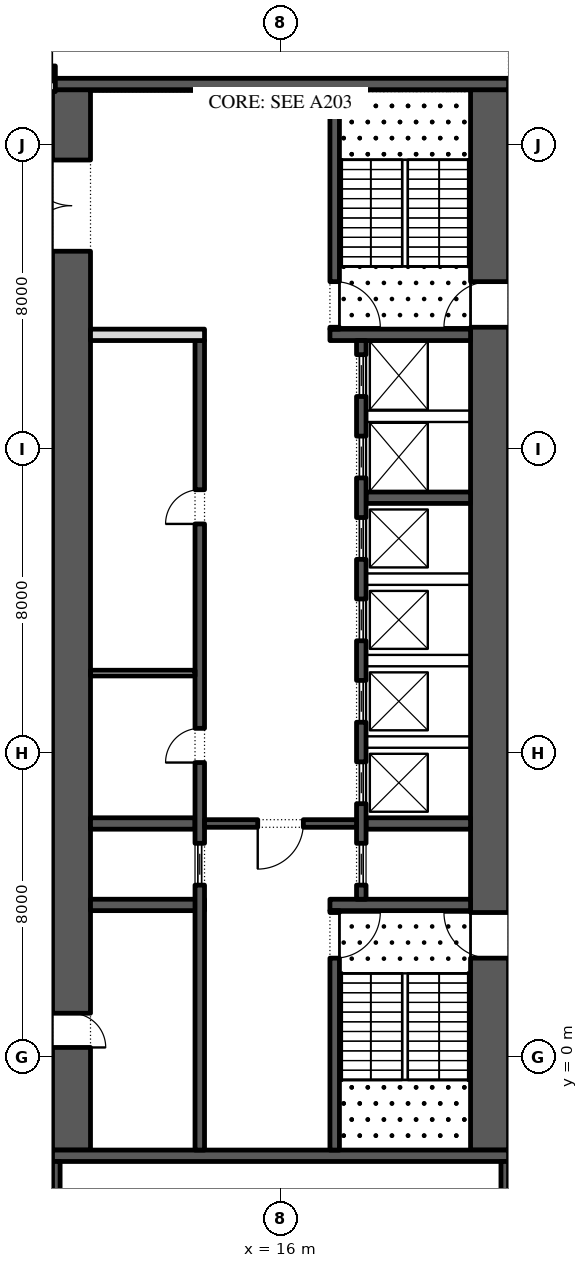
"""IFC4 building model, lengths in metres.
Left out: names, types, materials, properties, quantities, classifications, styles, units other than length and angle.
Written with IfcOpenShell. Run it as: python <this file> out.ifc"""

import sys

from ifc_helpers import new_model, si_unit, direction, frame, frame_2d, origin, place, context, subcontext, project, spatial, rectangle, extrude, element, fill, save


model = new_model("IFC4")
c1 = context("Model", 3, precision=1e-05, world=origin(), true_north=direction((0.0, 1.0)))
c2 = subcontext(c1, "Body", "Model", "MODEL_VIEW")
j1 = project(units=[si_unit("LENGTHUNIT", "METRE"), si_unit("PLANEANGLEUNIT", "RADIAN")], contexts=[c1])
p1 = place(None, origin())
s1 = spatial("IfcSite", under=j1, at=p1, CompositionType="ELEMENT")
p2 = place(p1, origin())
s2 = spatial("IfcBuilding", under=s1, at=p2, CompositionType="ELEMENT")
p3 = place(p2, origin())
s3 = spatial("IfcBuildingStorey", under=s2, at=p3, CompositionType="ELEMENT", Elevation=0.0)
p4 = place(p3, frame((21.5, -2.45, 0.0), z_axis=(0.0, 0.0, 1.0), x_axis=(0.0, 1.0, 0.0)))
e1 = element("IfcWall", 1, at=p4, inside=s3, PredefinedType="SHEAR", context=c2, shape_type="SweptSolid", body=[
    extrude(rectangle(XDim=27.9, YDim=1.0, at=frame_2d((13.95, 0.0))), origin(), (0.0, 0.0, 1.0), 7.7),
])
p5 = place(p4, frame((5.05, 0.0, 0.0)))
e2 = element("IfcOpeningElement", 2, at=p5, cuts=e1, PredefinedType="OPENING", context=c2, shape_type="SweptSolid", body=[
    extrude(rectangle(XDim=1.2, YDim=2.1, at=frame_2d((0.6, 1.05))), frame((0.0, 0.51, 0.0), z_axis=(0.0, -1.0, 0.0), x_axis=(1.0, 0.0, 0.0)), (0.0, 0.0, 1.0), 1.02),
])
p6 = place(p4, frame((21.65, 0.0, 0.0)))
e3 = element("IfcOpeningElement", 3, at=p6, cuts=e1, PredefinedType="OPENING", context=c2, shape_type="SweptSolid", body=[
    extrude(rectangle(XDim=1.2, YDim=2.1, at=frame_2d((0.6, 1.05))), frame((0.0, 0.51, 0.0), z_axis=(0.0, -1.0, 0.0), x_axis=(1.0, 0.0, 0.0)), (0.0, 0.0, 1.0), 1.02),
])
p7 = place(p3, frame((10.5, -2.45, 0.0), z_axis=(0.0, 0.0, 1.0), x_axis=(0.0, 1.0, 0.0)))
e4 = element("IfcWall", 4, at=p7, inside=s3, PredefinedType="SHEAR", context=c2, shape_type="SweptSolid", body=[
    extrude(rectangle(XDim=27.9, YDim=1.0, at=frame_2d((13.95, 0.0))), origin(), (0.0, 0.0, 1.0), 7.7),
])
p8 = place(p7, frame((23.65, 0.0, 0.0)))
e5 = element("IfcOpeningElement", 5, at=p8, cuts=e4, PredefinedType="OPENING", context=c2, shape_type="SweptSolid", body=[
    extrude(rectangle(XDim=2.4, YDim=2.1, at=frame_2d((1.2, 1.05))), frame((0.0, 0.51, 0.0), z_axis=(0.0, -1.0, 0.0), x_axis=(1.0, 0.0, 0.0)), (0.0, 0.0, 1.0), 1.02),
])
p9 = place(p7, frame((2.7, 0.0, 0.0)))
e6 = element("IfcOpeningElement", 6, at=p9, cuts=e4, PredefinedType="OPENING", context=c2, shape_type="SweptSolid", body=[
    extrude(rectangle(XDim=0.9, YDim=2.1, at=frame_2d((0.45, 1.05))), frame((0.0, 0.51, 0.0), z_axis=(0.0, -1.0, 0.0), x_axis=(1.0, 0.0, 0.0)), (0.0, 0.0, 1.0), 1.02),
])
for number, where, z_axis, x_axis in (
    (7, (10.0, -2.6, 0.0), (0.0, 0.0, 1.0), (1.0, 0.0, 0.0)),
    (8, (10.0, 25.6, 0.0), (0.0, 0.0, 1.0), (1.0, 0.0, 0.0)),
):
    element("IfcWall", number, at=place(p3, frame(where, z_axis=z_axis, x_axis=x_axis)), inside=s3, PredefinedType="SHEAR", context=c2, shape_type="SweptSolid", body=[
        extrude(rectangle(XDim=12.0, YDim=0.3, at=frame_2d((6.0, 0.0))), origin(), (0.0, 0.0, 1.0), 7.7),
    ])
p10 = place(p3, frame((17.3, 4.0, 0.0), z_axis=(0.0, 0.0, 1.0), x_axis=(1.0, 0.0, 0.0)))
e9 = element("IfcWall", 9, at=p10, inside=s3, PredefinedType="SHEAR", context=c2, shape_type="SweptSolid", body=[
    extrude(rectangle(XDim=3.7, YDim=0.3, at=frame_2d((1.85, 0.0))), origin(), (0.0, 0.0, 1.0), 7.7),
])
p11 = place(p3, frame((17.425, -2.45, 0.0), z_axis=(0.0, 0.0, 1.0), x_axis=(0.0, 1.0, 0.0)))
e10 = element("IfcWall", 10, at=p11, inside=s3, PredefinedType="SHEAR", context=c2, shape_type="SweptSolid", body=[
    extrude(rectangle(XDim=6.3, YDim=0.25, at=frame_2d((3.15, 0.0))), origin(), (0.0, 0.0, 1.0), 7.7),
])
p12 = place(p11, frame((5.05, 0.0, 0.0)))
e11 = element("IfcOpeningElement", 11, at=p12, cuts=e10, PredefinedType="OPENING", context=c2, shape_type="SweptSolid", body=[
    extrude(rectangle(XDim=1.2, YDim=2.1, at=frame_2d((0.6, 1.05))), frame((0.0, 0.135, 0.0), z_axis=(0.0, -1.0, 0.0), x_axis=(1.0, 0.0, 0.0)), (0.0, 0.0, 1.0), 0.27),
])
p13 = place(p3, frame((17.3, 19.0, 0.0), z_axis=(0.0, 0.0, 1.0), x_axis=(1.0, 0.0, 0.0)))
e12 = element("IfcWall", 12, at=p13, inside=s3, PredefinedType="SHEAR", context=c2, shape_type="SweptSolid", body=[
    extrude(rectangle(XDim=3.7, YDim=0.3, at=frame_2d((1.85, 0.0))), origin(), (0.0, 0.0, 1.0), 7.7),
])
p14 = place(p3, frame((17.425, 19.15, 0.0), z_axis=(0.0, 0.0, 1.0), x_axis=(0.0, 1.0, 0.0)))
e13 = element("IfcWall", 13, at=p14, inside=s3, PredefinedType="SHEAR", context=c2, shape_type="SweptSolid", body=[
    extrude(rectangle(XDim=6.3, YDim=0.25, at=frame_2d((3.15, 0.0))), origin(), (0.0, 0.0, 1.0), 7.7),
])
p15 = place(p14, frame((0.05, 0.0, 0.0)))
e14 = element("IfcOpeningElement", 14, at=p15, cuts=e13, PredefinedType="OPENING", context=c2, shape_type="SweptSolid", body=[
    extrude(rectangle(XDim=1.2, YDim=2.1, at=frame_2d((0.6, 1.05))), frame((0.0, 0.135, 0.0), z_axis=(0.0, -1.0, 0.0), x_axis=(1.0, 0.0, 0.0)), (0.0, 0.0, 1.0), 0.27),
])
for number, where, z_axis, x_axis in (
    (15, (18.25, 6.143, 0.0), (0.0, 0.0, 1.0), (1.0, 0.0, 0.0)),
    (16, (18.25, 14.714, 0.0), (0.0, 0.0, 1.0), (1.0, 0.0, 0.0)),
):
    element("IfcWall", number, at=place(p3, frame(where, z_axis=z_axis, x_axis=x_axis)), inside=s3, PredefinedType="SHEAR", context=c2, shape_type="SweptSolid", body=[
        extrude(rectangle(XDim=2.75, YDim=0.3, at=frame_2d((1.375, 0.0))), origin(), (0.0, 0.0, 1.0), 7.7),
    ])
p16 = place(p3, frame((18.125, 4.15, 0.0), z_axis=(0.0, 0.0, 1.0), x_axis=(0.0, 1.0, 0.0)))
e17 = element("IfcWall", 17, at=p16, inside=s3, PredefinedType="SHEAR", context=c2, shape_type="SweptSolid", body=[
    extrude(rectangle(XDim=14.7, YDim=0.25, at=frame_2d((7.35, 0.0))), origin(), (0.0, 0.0, 1.0), 7.7),
])
p17 = place(p16, frame((0.371, 0.0, 0.0)))
e18 = element("IfcOpeningElement", 18, at=p17, cuts=e17, PredefinedType="OPENING", context=c2, shape_type="SweptSolid", body=[
    extrude(rectangle(XDim=1.1, YDim=2.1, at=frame_2d((0.55, 1.05))), frame((0.0, 0.135, 0.0), z_axis=(0.0, -1.0, 0.0), x_axis=(1.0, 0.0, 0.0)), (0.0, 0.0, 1.0), 0.27),
])
p18 = place(p16, frame((2.514, 0.0, 0.0)))
e19 = element("IfcOpeningElement", 19, at=p18, cuts=e17, PredefinedType="OPENING", context=c2, shape_type="SweptSolid", body=[
    extrude(rectangle(XDim=1.1, YDim=2.1, at=frame_2d((0.55, 1.05))), frame((0.0, 0.135, 0.0), z_axis=(0.0, -1.0, 0.0), x_axis=(1.0, 0.0, 0.0)), (0.0, 0.0, 1.0), 0.27),
])
p19 = place(p16, frame((4.657, 0.0, 0.0)))
e20 = element("IfcOpeningElement", 20, at=p19, cuts=e17, PredefinedType="OPENING", context=c2, shape_type="SweptSolid", body=[
    extrude(rectangle(XDim=1.1, YDim=2.1, at=frame_2d((0.55, 1.05))), frame((0.0, 0.135, 0.0), z_axis=(0.0, -1.0, 0.0), x_axis=(1.0, 0.0, 0.0)), (0.0, 0.0, 1.0), 0.27),
])
p20 = place(p16, frame((6.8, 0.0, 0.0)))
e21 = element("IfcOpeningElement", 21, at=p20, cuts=e17, PredefinedType="OPENING", context=c2, shape_type="SweptSolid", body=[
    extrude(rectangle(XDim=1.1, YDim=2.1, at=frame_2d((0.55, 1.05))), frame((0.0, 0.135, 0.0), z_axis=(0.0, -1.0, 0.0), x_axis=(1.0, 0.0, 0.0)), (0.0, 0.0, 1.0), 0.27),
])
p21 = place(p16, frame((8.943, 0.0, 0.0)))
e22 = element("IfcOpeningElement", 22, at=p21, cuts=e17, PredefinedType="OPENING", context=c2, shape_type="SweptSolid", body=[
    extrude(rectangle(XDim=1.1, YDim=2.1, at=frame_2d((0.55, 1.05))), frame((0.0, 0.135, 0.0), z_axis=(0.0, -1.0, 0.0), x_axis=(1.0, 0.0, 0.0)), (0.0, 0.0, 1.0), 0.27),
])
p22 = place(p16, frame((11.086, 0.0, 0.0)))
e23 = element("IfcOpeningElement", 23, at=p22, cuts=e17, PredefinedType="OPENING", context=c2, shape_type="SweptSolid", body=[
    extrude(rectangle(XDim=1.1, YDim=2.1, at=frame_2d((0.55, 1.05))), frame((0.0, 0.135, 0.0), z_axis=(0.0, -1.0, 0.0), x_axis=(1.0, 0.0, 0.0)), (0.0, 0.0, 1.0), 0.27),
])
p23 = place(p16, frame((13.229, 0.0, 0.0)))
e24 = element("IfcOpeningElement", 24, at=p23, cuts=e17, PredefinedType="OPENING", context=c2, shape_type="SweptSolid", body=[
    extrude(rectangle(XDim=1.1, YDim=2.1, at=frame_2d((0.55, 1.05))), frame((0.0, 0.135, 0.0), z_axis=(0.0, -1.0, 0.0), x_axis=(1.0, 0.0, 0.0)), (0.0, 0.0, 1.0), 0.27),
])
p24 = place(p3, frame((11.0, 4.0, 0.0), z_axis=(0.0, 0.0, 1.0), x_axis=(1.0, 0.0, 0.0)))
e25 = element("IfcWall", 25, at=p24, inside=s3, PredefinedType="SHEAR", context=c2, shape_type="SweptSolid", body=[
    extrude(rectangle(XDim=3.0, YDim=0.3, at=frame_2d((1.5, 0.0))), origin(), (0.0, 0.0, 1.0), 7.7),
])
p25 = place(p3, frame((11.0, 6.143, 0.0), z_axis=(0.0, 0.0, 1.0), x_axis=(1.0, 0.0, 0.0)))
e26 = element("IfcWall", 26, at=p25, inside=s3, PredefinedType="SHEAR", context=c2, shape_type="SweptSolid", body=[
    extrude(rectangle(XDim=2.75, YDim=0.3, at=frame_2d((1.375, 0.0))), origin(), (0.0, 0.0, 1.0), 7.7),
])
p26 = place(p3, frame((13.875, -2.45, 0.0), z_axis=(0.0, 0.0, 1.0), x_axis=(0.0, 1.0, 0.0)))
e27 = element("IfcWall", 27, at=p26, inside=s3, PredefinedType="SHEAR", context=c2, shape_type="SweptSolid", body=[
    extrude(rectangle(XDim=21.3, YDim=0.25, at=frame_2d((10.65, 0.0))), origin(), (0.0, 0.0, 1.0), 7.7),
])
p27 = place(p26, frame((10.196, 0.0, 0.0)))
e28 = element("IfcOpeningElement", 28, at=p27, cuts=e27, PredefinedType="OPENING", context=c2, shape_type="SweptSolid", body=[
    extrude(rectangle(XDim=0.9, YDim=2.1, at=frame_2d((0.45, 1.05))), frame((0.0, 0.135, 0.0), z_axis=(0.0, -1.0, 0.0), x_axis=(1.0, 0.0, 0.0)), (0.0, 0.0, 1.0), 0.27),
])
p28 = place(p26, frame((16.475, 0.0, 0.0)))
e29 = element("IfcOpeningElement", 29, at=p28, cuts=e27, PredefinedType="OPENING", context=c2, shape_type="SweptSolid", body=[
    extrude(rectangle(XDim=0.9, YDim=2.1, at=frame_2d((0.45, 1.05))), frame((0.0, 0.135, 0.0), z_axis=(0.0, -1.0, 0.0), x_axis=(1.0, 0.0, 0.0)), (0.0, 0.0, 1.0), 0.27),
])
p29 = place(p26, frame((6.971, 0.0, 0.0)))
e30 = element("IfcOpeningElement", 30, at=p29, cuts=e27, PredefinedType="OPENING", context=c2, shape_type="SweptSolid", body=[
    extrude(rectangle(XDim=1.1, YDim=2.1, at=frame_2d((0.55, 1.05))), frame((0.0, 0.135, 0.0), z_axis=(0.0, -1.0, 0.0), x_axis=(1.0, 0.0, 0.0)), (0.0, 0.0, 1.0), 0.27),
])
p30 = place(p3, frame((11.0, 19.0, 0.0), z_axis=(0.0, 0.0, 1.0), x_axis=(1.0, 0.0, 0.0)))
e31 = element("IfcWall", 31, at=p30, inside=s3, PredefinedType="PARTITIONING", context=c2, shape_type="SweptSolid", body=[
    extrude(rectangle(XDim=3.0, YDim=0.3, at=frame_2d((1.5, 0.0))), origin(), (0.0, 0.0, 1.0), 7.7),
])
p31 = place(p3, frame((11.0, 10.1, 0.0), z_axis=(0.0, 0.0, 1.0), x_axis=(1.0, 0.0, 0.0)))
e32 = element("IfcWall", 32, at=p31, inside=s3, PredefinedType="PARTITIONING", context=c2, shape_type="SweptSolid", body=[
    extrude(rectangle(XDim=2.75, YDim=0.15, at=frame_2d((1.375, 0.0))), origin(), (0.0, 0.0, 1.0), 7.7),
])
p32 = place(p3, frame((14.0, 6.143, 0.0), z_axis=(0.0, 0.0, 1.0), x_axis=(1.0, 0.0, 0.0)))
e33 = element("IfcWall", 33, at=p32, inside=s3, PredefinedType="SHEAR", context=c2, shape_type="SweptSolid", body=[
    extrude(rectangle(XDim=4.0, YDim=0.2, at=frame_2d((2.0, 0.0))), origin(), (0.0, 0.0, 1.0), 7.7),
])
p33 = place(p32, frame((1.4, 0.0, 0.0)))
e34 = element("IfcOpeningElement", 34, at=p33, cuts=e33, PredefinedType="OPENING", context=c2, shape_type="SweptSolid", body=[
    extrude(rectangle(XDim=1.2, YDim=2.1, at=frame_2d((0.6, 1.05))), frame((0.0, 0.11, 0.0), z_axis=(0.0, -1.0, 0.0), x_axis=(1.0, 0.0, 0.0)), (0.0, 0.0, 1.0), 0.22),
])
p34 = place(p3, frame((21.9, -15.8, 0.0), z_axis=(0.0, 0.0, 1.0), x_axis=(0.0, 1.0, 0.0)))
e35 = element("IfcWall", 35, at=p34, inside=s3, PredefinedType="SHEAR", context=c2, shape_type="SweptSolid", body=[
    extrude(rectangle(XDim=13.05, YDim=0.2, at=frame_2d((6.525, 0.0))), origin(), (0.0, 0.0, 1.0), 7.7),
])
p35 = place(p34, frame((1.175, 0.0, 0.0)))
e36 = element("IfcOpeningElement", 36, at=p35, cuts=e35, PredefinedType="OPENING", context=c2, shape_type="SweptSolid", body=[
    extrude(rectangle(XDim=0.9, YDim=2.1, at=frame_2d((0.45, 1.05))), frame((0.0, 0.11, 0.0), z_axis=(0.0, -1.0, 0.0), x_axis=(1.0, 0.0, 0.0)), (0.0, 0.0, 1.0), 0.22),
])
p36 = place(p34, frame((4.413, 0.0, 0.0)))
e37 = element("IfcOpeningElement", 37, at=p36, cuts=e35, PredefinedType="OPENING", context=c2, shape_type="SweptSolid", body=[
    extrude(rectangle(XDim=1.0, YDim=2.1, at=frame_2d((0.5, 1.05))), frame((0.0, 0.11, 0.0), z_axis=(0.0, -1.0, 0.0), x_axis=(1.0, 0.0, 0.0)), (0.0, 0.0, 1.0), 0.22),
])
p37 = place(p34, frame((9.363, 0.0, 0.0)))
e38 = element("IfcOpeningElement", 38, at=p37, cuts=e35, PredefinedType="OPENING", context=c2, shape_type="SweptSolid", body=[
    extrude(rectangle(XDim=0.9, YDim=2.1, at=frame_2d((0.45, 1.05))), frame((0.0, 0.11, 0.0), z_axis=(0.0, -1.0, 0.0), x_axis=(1.0, 0.0, 0.0)), (0.0, 0.0, 1.0), 0.22),
])
p38 = place(p3, frame((10.1, -15.8, 0.0), z_axis=(0.0, 0.0, 1.0), x_axis=(0.0, 1.0, 0.0)))
e39 = element("IfcWall", 39, at=p38, inside=s3, PredefinedType="SHEAR", context=c2, shape_type="SweptSolid", body=[
    extrude(rectangle(XDim=13.05, YDim=0.2, at=frame_2d((6.525, 0.0))), origin(), (0.0, 0.0, 1.0), 7.7),
])
p39 = place(p38, frame((4.462, 0.0, 0.0)))
e40 = element("IfcOpeningElement", 40, at=p39, cuts=e39, PredefinedType="OPENING", context=c2, shape_type="SweptSolid", body=[
    extrude(rectangle(XDim=0.9, YDim=2.1, at=frame_2d((0.45, 1.05))), frame((0.0, 0.11, 0.0), z_axis=(0.0, -1.0, 0.0), x_axis=(1.0, 0.0, 0.0)), (0.0, 0.0, 1.0), 0.22),
])
p40 = place(p3, frame((10.0, 25.4, 0.0), z_axis=(0.0, 0.0, 1.0), x_axis=(0.0, 1.0, 0.0)))
e41 = element("IfcWall", 41, at=p40, inside=s3, PredefinedType="PARTITIONING", context=c2, shape_type="SweptSolid", body=[
    extrude(rectangle(XDim=0.675, YDim=0.15, at=frame_2d((0.337, 0.0))), origin(), (0.0, 0.0, 1.0), 7.7),
])
p41 = place(p17, origin())
e42 = element("IfcDoor", 42, at=p41, inside=s3, OperationType="SLIDING_TO_LEFT", PredefinedType="DOOR", context=c2, shape_type="SweptSolid", body=[
    extrude(rectangle(XDim=1.1, YDim=2.1, at=frame_2d((0.55, 1.05))), frame((0.0, 0.025, 0.0), z_axis=(0.0, -1.0, 0.0), x_axis=(1.0, 0.0, 0.0)), (0.0, 0.0, 1.0), 0.05),
])
fill(e18, e42)
p42 = place(p18, origin())
e43 = element("IfcDoor", 43, at=p42, inside=s3, OperationType="SLIDING_TO_LEFT", PredefinedType="DOOR", context=c2, shape_type="SweptSolid", body=[
    extrude(rectangle(XDim=1.1, YDim=2.1, at=frame_2d((0.55, 1.05))), frame((0.0, 0.025, 0.0), z_axis=(0.0, -1.0, 0.0), x_axis=(1.0, 0.0, 0.0)), (0.0, 0.0, 1.0), 0.05),
])
fill(e19, e43)
p43 = place(p19, origin())
e44 = element("IfcDoor", 44, at=p43, inside=s3, OperationType="SLIDING_TO_LEFT", PredefinedType="DOOR", context=c2, shape_type="SweptSolid", body=[
    extrude(rectangle(XDim=1.1, YDim=2.1, at=frame_2d((0.55, 1.05))), frame((0.0, 0.025, 0.0), z_axis=(0.0, -1.0, 0.0), x_axis=(1.0, 0.0, 0.0)), (0.0, 0.0, 1.0), 0.05),
])
fill(e20, e44)
p44 = place(p20, origin())
e45 = element("IfcDoor", 45, at=p44, inside=s3, OperationType="SLIDING_TO_LEFT", PredefinedType="DOOR", context=c2, shape_type="SweptSolid", body=[
    extrude(rectangle(XDim=1.1, YDim=2.1, at=frame_2d((0.55, 1.05))), frame((0.0, 0.025, 0.0), z_axis=(0.0, -1.0, 0.0), x_axis=(1.0, 0.0, 0.0)), (0.0, 0.0, 1.0), 0.05),
])
fill(e21, e45)
p45 = place(p21, origin())
e46 = element("IfcDoor", 46, at=p45, inside=s3, OperationType="SLIDING_TO_LEFT", PredefinedType="DOOR", context=c2, shape_type="SweptSolid", body=[
    extrude(rectangle(XDim=1.1, YDim=2.1, at=frame_2d((0.55, 1.05))), frame((0.0, 0.025, 0.0), z_axis=(0.0, -1.0, 0.0), x_axis=(1.0, 0.0, 0.0)), (0.0, 0.0, 1.0), 0.05),
])
fill(e22, e46)
p46 = place(p22, origin())
e47 = element("IfcDoor", 47, at=p46, inside=s3, OperationType="SLIDING_TO_LEFT", PredefinedType="DOOR", context=c2, shape_type="SweptSolid", body=[
    extrude(rectangle(XDim=1.1, YDim=2.1, at=frame_2d((0.55, 1.05))), frame((0.0, 0.025, 0.0), z_axis=(0.0, -1.0, 0.0), x_axis=(1.0, 0.0, 0.0)), (0.0, 0.0, 1.0), 0.05),
])
fill(e23, e47)
p47 = place(p23, origin())
e48 = element("IfcDoor", 48, at=p47, inside=s3, OperationType="SLIDING_TO_LEFT", PredefinedType="DOOR", context=c2, shape_type="SweptSolid", body=[
    extrude(rectangle(XDim=1.1, YDim=2.1, at=frame_2d((0.55, 1.05))), frame((0.0, 0.025, 0.0), z_axis=(0.0, -1.0, 0.0), x_axis=(1.0, 0.0, 0.0)), (0.0, 0.0, 1.0), 0.05),
])
fill(e24, e48)
p48 = place(p27, origin())
e49 = element("IfcDoor", 49, at=p48, inside=s3, OperationType="SINGLE_SWING_RIGHT", PredefinedType="DOOR", context=c2, shape_type="SweptSolid", body=[
    extrude(rectangle(XDim=0.9, YDim=2.1, at=frame_2d((0.45, 1.05))), frame((0.0, 0.125, 0.0), z_axis=(0.0, -1.0, 0.0), x_axis=(1.0, 0.0, 0.0)), (0.0, 0.0, 1.0), 0.05),
])
fill(e28, e49)
p49 = place(p28, origin())
e50 = element("IfcDoor", 50, at=p49, inside=s3, OperationType="SINGLE_SWING_RIGHT", PredefinedType="DOOR", context=c2, shape_type="SweptSolid", body=[
    extrude(rectangle(XDim=0.9, YDim=2.1, at=frame_2d((0.45, 1.05))), frame((0.0, 0.125, 0.0), z_axis=(0.0, -1.0, 0.0), x_axis=(1.0, 0.0, 0.0)), (0.0, 0.0, 1.0), 0.05),
])
fill(e29, e50)
p50 = place(p29, origin())
e51 = element("IfcDoor", 51, at=p50, inside=s3, OperationType="SLIDING_TO_LEFT", PredefinedType="DOOR", context=c2, shape_type="SweptSolid", body=[
    extrude(rectangle(XDim=1.1, YDim=2.1, at=frame_2d((0.55, 1.05))), frame((0.0, 0.025, 0.0), z_axis=(0.0, -1.0, 0.0), x_axis=(1.0, 0.0, 0.0)), (0.0, 0.0, 1.0), 0.05),
])
fill(e30, e51)
p51 = place(p33, frame((1.2, 0.0, 0.0), z_axis=(0.0, 0.0, 1.0), x_axis=(-1.0, 0.0, 0.0)))
e52 = element("IfcDoor", 52, at=p51, inside=s3, OperationType="SINGLE_SWING_LEFT", PredefinedType="DOOR", context=c2, shape_type="SweptSolid", body=[
    extrude(rectangle(XDim=1.2, YDim=2.1, at=frame_2d((0.6, 1.05))), frame((0.0, 0.025, 0.0), z_axis=(0.0, -1.0, 0.0), x_axis=(1.0, 0.0, 0.0)), (0.0, 0.0, 1.0), 0.05),
])
fill(e34, e52)
p52 = place(p8, origin())
e53 = element("IfcDoor", 53, at=p52, inside=s3, OperationType="DOUBLE_DOOR_SINGLE_SWING", PredefinedType="DOOR", context=c2, shape_type="SweptSolid", body=[
    extrude(rectangle(XDim=2.4, YDim=2.1, at=frame_2d((1.2, 1.05))), frame((0.0, 0.025, 0.0), z_axis=(0.0, -1.0, 0.0), x_axis=(1.0, 0.0, 0.0)), (0.0, 0.0, 1.0), 0.05),
])
fill(e5, e53)
p53 = place(p12, frame((1.2, 0.0, 0.0), z_axis=(0.0, 0.0, 1.0), x_axis=(-1.0, 0.0, 0.0)))
e54 = element("IfcDoor", 54, at=p53, inside=s3, OperationType="SINGLE_SWING_RIGHT", PredefinedType="DOOR", context=c2, shape_type="SweptSolid", body=[
    extrude(rectangle(XDim=1.2, YDim=2.1, at=frame_2d((0.6, 1.05))), frame((0.0, 0.025, 0.0), z_axis=(0.0, -1.0, 0.0), x_axis=(1.0, 0.0, 0.0)), (0.0, 0.0, 1.0), 0.05),
])
fill(e11, e54)
p54 = place(p5, origin())
e55 = element("IfcDoor", 55, at=p54, inside=s3, OperationType="SINGLE_SWING_LEFT", PredefinedType="DOOR", context=c2, shape_type="SweptSolid", body=[
    extrude(rectangle(XDim=1.2, YDim=2.1, at=frame_2d((0.6, 1.05))), frame((0.0, 0.025, 0.0), z_axis=(0.0, -1.0, 0.0), x_axis=(1.0, 0.0, 0.0)), (0.0, 0.0, 1.0), 0.05),
])
fill(e2, e55)
p55 = place(p15, frame((1.2, 0.0, 0.0), z_axis=(0.0, 0.0, 1.0), x_axis=(-1.0, 0.0, 0.0)))
e56 = element("IfcDoor", 56, at=p55, inside=s3, OperationType="SINGLE_SWING_LEFT", PredefinedType="DOOR", context=c2, shape_type="SweptSolid", body=[
    extrude(rectangle(XDim=1.2, YDim=2.1, at=frame_2d((0.6, 1.05))), frame((0.0, 0.025, 0.0), z_axis=(0.0, -1.0, 0.0), x_axis=(1.0, 0.0, 0.0)), (0.0, 0.0, 1.0), 0.05),
])
fill(e14, e56)
p56 = place(p6, origin())
e57 = element("IfcDoor", 57, at=p56, inside=s3, OperationType="SINGLE_SWING_RIGHT", PredefinedType="DOOR", context=c2, shape_type="SweptSolid", body=[
    extrude(rectangle(XDim=1.2, YDim=2.1, at=frame_2d((0.6, 1.05))), frame((0.0, 0.025, 0.0), z_axis=(0.0, -1.0, 0.0), x_axis=(1.0, 0.0, 0.0)), (0.0, 0.0, 1.0), 0.05),
])
fill(e3, e57)
p57 = place(p9, frame((0.9, -0.95, 0.0), z_axis=(0.0, 0.0, 1.0), x_axis=(-1.0, 0.0, 0.0)))
e58 = element("IfcDoor", 58, at=p57, inside=s3, OperationType="SINGLE_SWING_LEFT", PredefinedType="DOOR", context=c2, shape_type="SweptSolid", body=[
    extrude(rectangle(XDim=0.9, YDim=2.1, at=frame_2d((0.45, 1.05))), frame((0.0, -0.45, 0.0), z_axis=(0.0, -1.0, 0.0), x_axis=(1.0, 0.0, 0.0)), (0.0, 0.0, 1.0), 0.05),
])
fill(e6, e58)
save(model, sys.argv[1])
